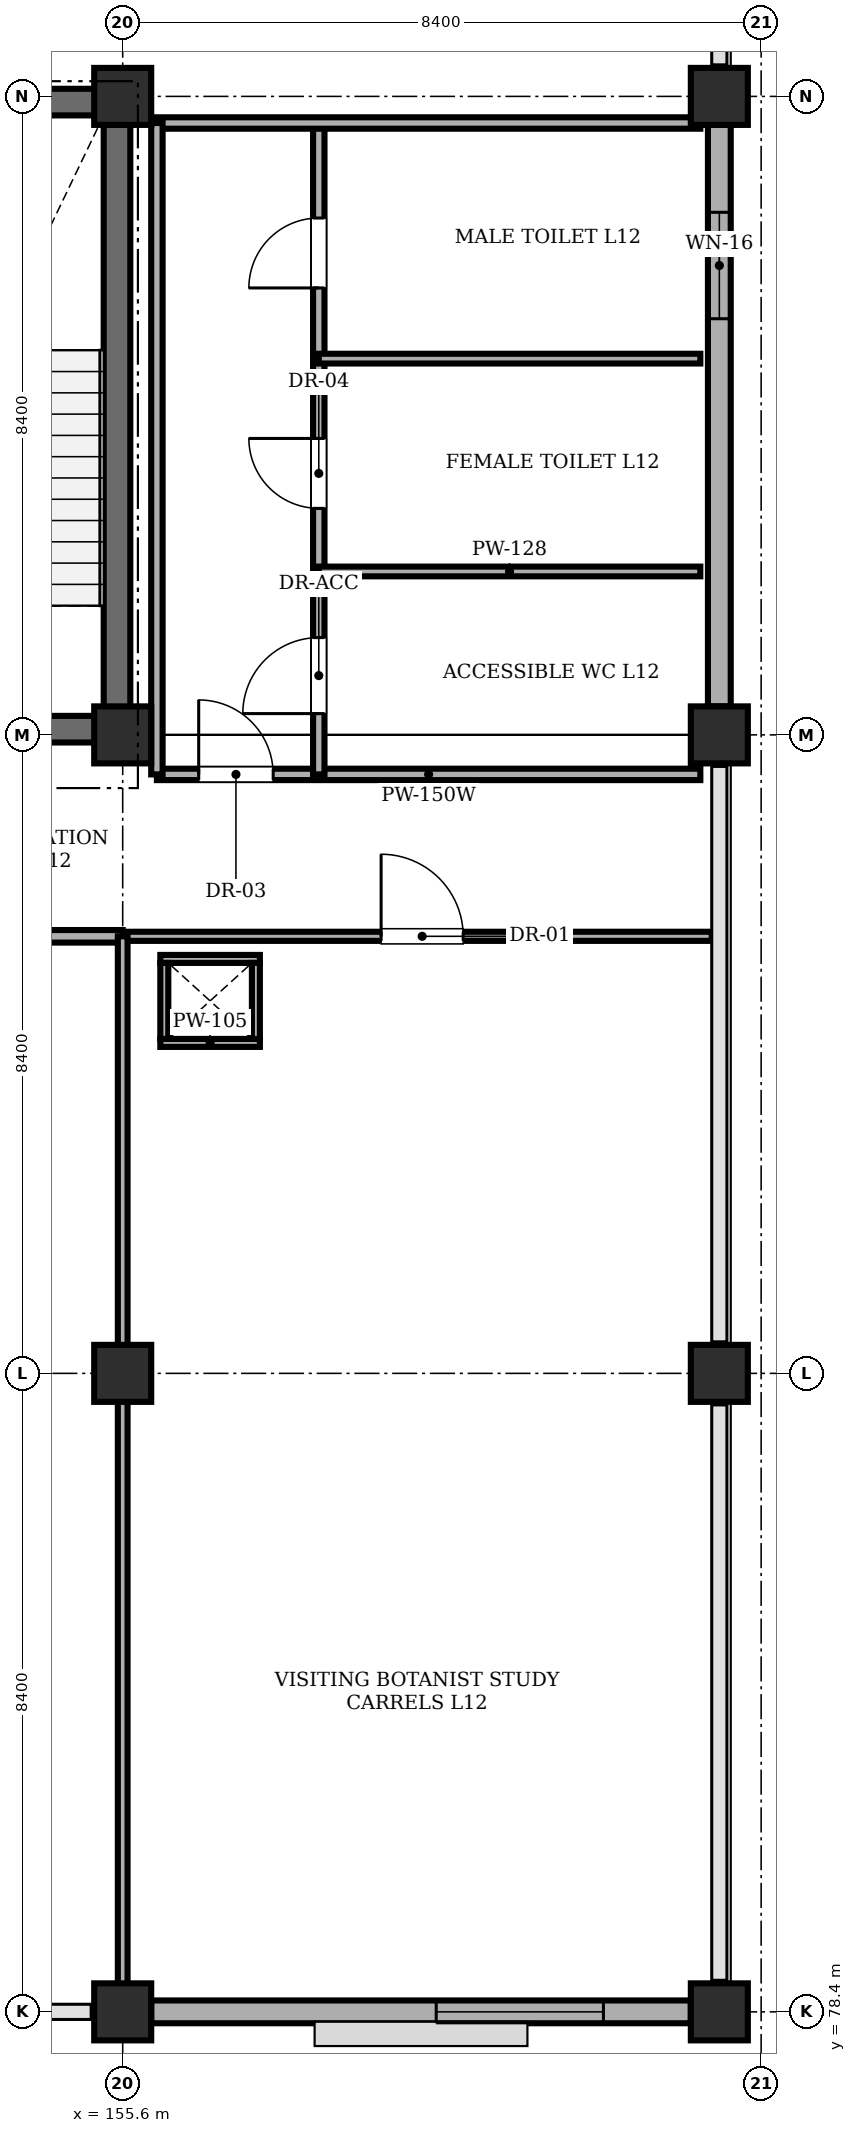
"""IFC4 building model, lengths in metres.
Left out: names, types, materials, properties, quantities, classifications, styles, units other than length and angle.
Written with IfcOpenShell. Run it as: python <this file> out.ifc"""

import sys

from ifc_helpers import new_model, si_unit, direction, frame, frame_2d, origin, origin_2d, place, context, subcontext, project, spatial, rectangle, extrude, element, fill, save


model = new_model("IFC4")
c1 = context("Model", 3, precision=1e-05, world=origin(), true_north=direction((0.0, 1.0)))
c2 = subcontext(c1, "Body", "Model", "MODEL_VIEW")
j1 = project(units=[si_unit("LENGTHUNIT", "METRE"), si_unit("PLANEANGLEUNIT", "RADIAN")], contexts=[c1])
p1 = place(None, origin())
s1 = spatial("IfcSite", under=j1, at=p1, CompositionType="ELEMENT")
p2 = place(p1, origin())
s2 = spatial("IfcBuilding", under=s1, at=p2, CompositionType="ELEMENT")
p3 = place(p2, frame((0.0, 0.0, 48.6)))
s3 = spatial("IfcBuildingStorey", under=s2, at=p3, CompositionType="ELEMENT", Elevation=48.6)
for number, where, z_axis, x_axis in (
    (1, (155.6, 78.4, 0.0), (0.0, 0.0, 1.0), (1.0, 0.0, 0.0)),
    (2, (155.6, 86.8, 0.0), (0.0, 0.0, 1.0), (1.0, 0.0, 0.0)),
    (3, (155.6, 95.2, 0.0), (0.0, 0.0, 1.0), (1.0, 0.0, 0.0)),
    (4, (155.6, 103.6, 0.0), (0.0, 0.0, 1.0), (1.0, 0.0, 0.0)),
    (5, (163.45, 78.4, 0.0), (0.0, 0.0, 1.0), (1.0, 0.0, 0.0)),
    (6, (163.45, 86.8, 0.0), (0.0, 0.0, 1.0), (1.0, 0.0, 0.0)),
    (7, (163.45, 95.2, 0.0), (0.0, 0.0, 1.0), (1.0, 0.0, 0.0)),
    (8, (163.45, 103.6, 0.0), (0.0, 0.0, 1.0), (1.0, 0.0, 0.0)),
):
    element("IfcColumn", number, at=place(p3, frame(where, z_axis=z_axis, x_axis=x_axis)), inside=s3, PredefinedType="COLUMN", context=c2, shape_type="SweptSolid", body=[
        extrude(rectangle(XDim=0.75, YDim=0.75, at=origin_2d()), origin(), (0.0, 0.0, 1.0), 4.03),
    ])
for number, where, z_axis, x_axis in (
    (9, (151.9, 95.275, 0.0), (0.0, 0.0, 1.0), (1.0, 0.0, 0.0)),
    (10, (151.9, 103.525, 0.0), (0.0, 0.0, 1.0), (1.0, 0.0, 0.0)),
):
    element("IfcWall", number, at=place(p3, frame(where, z_axis=z_axis, x_axis=x_axis)), inside=s3, PredefinedType="SHEAR", context=c2, shape_type="SweptSolid", body=[
        extrude(rectangle(XDim=3.8, YDim=0.35, at=frame_2d((1.9, 0.0))), origin(), (0.0, 0.0, 1.0), 4.03),
    ])
p4 = place(p3, frame((155.525, 95.45, 0.0), z_axis=(0.0, 0.0, 1.0), x_axis=(0.0, 1.0, 0.0)))
e11 = element("IfcWall", 11, at=p4, inside=s3, PredefinedType="SHEAR", context=c2, shape_type="SweptSolid", body=[
    extrude(rectangle(XDim=7.9, YDim=0.35, at=frame_2d((3.95, 0.0))), origin(), (0.0, 0.0, 1.0), 4.03),
])
p5 = place(p3, frame((163.075, 78.4, 0.0), z_axis=(0.0, 0.0, 1.0), x_axis=(-1.0, 0.0, 0.0)))
e12 = element("IfcWall", 12, at=p5, inside=s3, PredefinedType="STANDARD", context=c2, shape_type="SweptSolid", body=[
    extrude(rectangle(XDim=7.1, YDim=0.3, at=frame_2d((3.55, 0.0))), origin(), (0.0, 0.0, 1.0), 3.33),
])
p6 = place(p5, frame((1.15, 0.0, 0.95)))
e13 = element("IfcOpeningElement", 13, at=p6, cuts=e12, PredefinedType="OPENING", context=c2, shape_type="SweptSolid", body=[
    extrude(rectangle(XDim=2.2, YDim=2.0, at=frame_2d((1.1, 1.0))), frame((0.0, 0.16, 0.0), z_axis=(0.0, -1.0, 0.0), x_axis=(1.0, 0.0, 0.0)), (0.0, 0.0, 1.0), 0.32),
])
p7 = place(p3, frame((163.45, 103.225, 0.0), z_axis=(0.0, 0.0, 1.0), x_axis=(0.0, -1.0, 0.0)))
e14 = element("IfcWall", 14, at=p7, inside=s3, PredefinedType="STANDARD", context=c2, shape_type="SweptSolid", body=[
    extrude(rectangle(XDim=7.65, YDim=0.3, at=frame_2d((3.825, 0.0))), origin(), (0.0, 0.0, 1.0), 3.33),
])
p8 = place(p7, frame((1.15, 0.0, 1.1)))
e15 = element("IfcOpeningElement", 15, at=p8, cuts=e14, PredefinedType="OPENING", context=c2, shape_type="SweptSolid", body=[
    extrude(rectangle(XDim=1.4, YDim=1.4, at=frame_2d((0.7, 0.7))), frame((0.0, 0.16, 0.0), z_axis=(0.0, -1.0, 0.0), x_axis=(1.0, 0.0, 0.0)), (0.0, 0.0, 1.0), 0.32),
])
p9 = place(p3, frame((156.05, 94.68, 0.0), z_axis=(0.0, 0.0, 1.0), x_axis=(1.0, 0.0, 0.0)))
e16 = element("IfcWall", 16, at=p9, inside=s3, PredefinedType="PARTITIONING", context=c2, shape_type="SweptSolid", body=[
    extrude(rectangle(XDim=7.15, YDim=0.15, at=frame_2d((3.575, 0.0))), origin(), (0.0, 0.0, 1.0), 4.03),
])
p10 = place(p9, frame((0.55, 0.0, 0.0)))
e17 = element("IfcOpeningElement", 17, at=p10, cuts=e16, PredefinedType="OPENING", context=c2, shape_type="SweptSolid", body=[
    extrude(rectangle(XDim=0.98, YDim=2.12, at=frame_2d((0.49, 1.06))), frame((0.0, 0.085, 0.0), z_axis=(0.0, -1.0, 0.0), x_axis=(1.0, 0.0, 0.0)), (0.0, 0.0, 1.0), 0.17),
])
p11 = place(p3, frame((158.18, 94.68, 0.0), z_axis=(0.0, 0.0, 1.0), x_axis=(0.0, 1.0, 0.0)))
e18 = element("IfcWall", 18, at=p11, inside=s3, PredefinedType="PARTITIONING", context=c2, shape_type="SweptSolid", body=[
    extrude(rectangle(XDim=8.57, YDim=0.15, at=frame_2d((4.285, 0.0))), origin(), (0.0, 0.0, 1.0), 4.03),
])
p12 = place(p11, frame((0.8, 0.0, 0.0)))
e19 = element("IfcOpeningElement", 19, at=p12, cuts=e18, PredefinedType="OPENING", context=c2, shape_type="SweptSolid", body=[
    extrude(rectangle(XDim=1.0, YDim=2.12, at=frame_2d((0.5, 1.06))), frame((0.0, 0.085, 0.0), z_axis=(0.0, -1.0, 0.0), x_axis=(1.0, 0.0, 0.0)), (0.0, 0.0, 1.0), 0.17),
])
p13 = place(p11, frame((3.5, 0.0, 0.0)))
e20 = element("IfcOpeningElement", 20, at=p13, cuts=e18, PredefinedType="OPENING", context=c2, shape_type="SweptSolid", body=[
    extrude(rectangle(XDim=0.92, YDim=2.1, at=frame_2d((0.46, 1.05))), frame((0.0, 0.085, 0.0), z_axis=(0.0, -1.0, 0.0), x_axis=(1.0, 0.0, 0.0)), (0.0, 0.0, 1.0), 0.17),
])
p14 = place(p11, frame((6.4, 0.0, 0.0)))
e21 = element("IfcOpeningElement", 21, at=p14, cuts=e18, PredefinedType="OPENING", context=c2, shape_type="SweptSolid", body=[
    extrude(rectangle(XDim=0.92, YDim=2.1, at=frame_2d((0.46, 1.05))), frame((0.0, 0.085, 0.0), z_axis=(0.0, -1.0, 0.0), x_axis=(1.0, 0.0, 0.0)), (0.0, 0.0, 1.0), 0.17),
])
for number, where, z_axis, x_axis in (
    (22, (158.18, 97.35, 0.0), (0.0, 0.0, 1.0), (1.0, 0.0, 0.0)),
    (23, (158.18, 100.15, 0.0), (0.0, 0.0, 1.0), (1.0, 0.0, 0.0)),
):
    element("IfcWall", number, at=place(p3, frame(where, z_axis=z_axis, x_axis=x_axis)), inside=s3, PredefinedType="PARTITIONING", context=c2, shape_type="SweptSolid", body=[
        extrude(rectangle(XDim=5.02, YDim=0.128, at=frame_2d((2.51, 0.0))), origin(), (0.0, 0.0, 1.0), 4.03),
    ])
p15 = place(p3, frame((156.05, 103.25, 0.0), z_axis=(0.0, 0.0, 1.0), x_axis=(1.0, 0.0, 0.0)))
e24 = element("IfcWall", 24, at=p15, inside=s3, PredefinedType="PARTITIONING", context=c2, shape_type="SweptSolid", body=[
    extrude(rectangle(XDim=7.15, YDim=0.15, at=frame_2d((3.575, 0.0))), origin(), (0.0, 0.0, 1.0), 4.03),
])
p16 = place(p3, frame((156.05, 94.68, 0.0), z_axis=(0.0, 0.0, 1.0), x_axis=(0.0, 1.0, 0.0)))
e25 = element("IfcWall", 25, at=p16, inside=s3, PredefinedType="PARTITIONING", context=c2, shape_type="SweptSolid", body=[
    extrude(rectangle(XDim=8.57, YDim=0.15, at=frame_2d((4.285, 0.0))), origin(), (0.0, 0.0, 1.0), 4.03),
])
p17 = place(p3, frame((138.95, 92.55, 0.0), z_axis=(0.0, 0.0, 1.0), x_axis=(1.0, 0.0, 0.0)))
e26 = element("IfcWall", 26, at=p17, inside=s3, PredefinedType="PARTITIONING", context=c2, shape_type="SweptSolid", body=[
    extrude(rectangle(XDim=16.65, YDim=0.165, at=frame_2d((8.325, 0.0))), origin(), (0.0, 0.0, 1.0), 4.03),
])
p18 = place(p17, frame((3.65, 0.0, 0.0)))
e27 = element("IfcOpeningElement", 27, at=p18, cuts=e26, PredefinedType="OPENING", context=c2, shape_type="SweptSolid", body=[
    extrude(rectangle(XDim=1.64, YDim=2.24, at=frame_2d((0.82, 1.12))), frame((0.0, 0.093, 0.0), z_axis=(0.0, -1.0, 0.0), x_axis=(1.0, 0.0, 0.0)), (0.0, 0.0, 1.0), 0.185),
])
p19 = place(p3, frame((155.6, 92.55, 0.0), z_axis=(0.0, 0.0, 1.0), x_axis=(1.0, 0.0, 0.0)))
e28 = element("IfcWall", 28, at=p19, inside=s3, PredefinedType="PARTITIONING", context=c2, shape_type="SweptSolid", body=[
    extrude(rectangle(XDim=7.75, YDim=0.12, at=frame_2d((3.875, 0.0))), origin(), (0.0, 0.0, 1.0), 4.03),
])
p20 = place(p19, frame((3.4, 0.0, 0.0)))
e29 = element("IfcOpeningElement", 29, at=p20, cuts=e28, PredefinedType="OPENING", context=c2, shape_type="SweptSolid", body=[
    extrude(rectangle(XDim=1.08, YDim=2.15, at=frame_2d((0.54, 1.075))), frame((0.0, 0.07, 0.0), z_axis=(0.0, -1.0, 0.0), x_axis=(1.0, 0.0, 0.0)), (0.0, 0.0, 1.0), 0.14),
])
p21 = place(p3, frame((155.6, 78.55, 0.0), z_axis=(0.0, 0.0, 1.0), x_axis=(0.0, 1.0, 0.0)))
e30 = element("IfcWall", 30, at=p21, inside=s3, PredefinedType="PARTITIONING", context=c2, shape_type="SweptSolid", body=[
    extrude(rectangle(XDim=14.0, YDim=0.128, at=frame_2d((7.0, 0.0))), origin(), (0.0, 0.0, 1.0), 3.33),
])
for number, where, z_axis, x_axis in (
    (31, (156.095, 91.147, 0.0), (0.0, 0.0, 1.0), (1.0, 0.0, 0.0)),
    (32, (156.095, 92.252, 0.0), (0.0, 0.0, 1.0), (1.0, 0.0, 0.0)),
):
    element("IfcWall", number, at=place(p3, frame(where, z_axis=z_axis, x_axis=x_axis)), inside=s3, PredefinedType="PARTITIONING", context=c2, shape_type="SweptSolid", body=[
        extrude(rectangle(XDim=1.31, YDim=0.105, at=frame_2d((0.655, 0.0))), origin(), (0.0, 0.0, 1.0), 4.03),
    ])
for number, where, z_axis, x_axis in (
    (33, (156.147, 91.2, 0.0), (0.0, 0.0, 1.0), (0.0, 1.0, 0.0)),
    (34, (157.353, 91.2, 0.0), (0.0, 0.0, 1.0), (0.0, 1.0, 0.0)),
):
    element("IfcWall", number, at=place(p3, frame(where, z_axis=z_axis, x_axis=x_axis)), inside=s3, PredefinedType="PARTITIONING", context=c2, shape_type="SweptSolid", body=[
        extrude(rectangle(XDim=1.0, YDim=0.105, at=frame_2d((0.5, 0.0))), origin(), (0.0, 0.0, 1.0), 4.03),
    ])
p22 = place(p6, origin())
e35 = element("IfcWindow", 35, at=p22, inside=s3, PartitioningType="DOUBLE_PANEL_VERTICAL", PredefinedType="WINDOW", context=c2, shape_type="SweptSolid", body=[
    extrude(rectangle(XDim=2.2, YDim=2.0, at=frame_2d((1.1, 1.0))), frame((0.0, 0.03, 0.0), z_axis=(0.0, -1.0, 0.0), x_axis=(1.0, 0.0, 0.0)), (0.0, 0.0, 1.0), 0.06),
])
fill(e13, e35)
p23 = place(p8, origin())
e36 = element("IfcWindow", 36, at=p23, inside=s3, PartitioningType="SINGLE_PANEL", PredefinedType="WINDOW", context=c2, shape_type="SweptSolid", body=[
    extrude(rectangle(XDim=1.4, YDim=1.4, at=frame_2d((0.7, 0.7))), frame((0.0, 0.03, 0.0), z_axis=(0.0, -1.0, 0.0), x_axis=(1.0, 0.0, 0.0)), (0.0, 0.0, 1.0), 0.06),
])
fill(e15, e36)
p24 = place(p10, origin())
e37 = element("IfcDoor", 37, at=p24, inside=s3, OperationType="SINGLE_SWING_LEFT", PredefinedType="DOOR", context=c2, shape_type="SweptSolid", body=[
    extrude(rectangle(XDim=0.98, YDim=2.12, at=frame_2d((0.49, 1.06))), frame((0.0, 0.025, 0.0), z_axis=(0.0, -1.0, 0.0), x_axis=(1.0, 0.0, 0.0)), (0.0, 0.0, 1.0), 0.05),
])
fill(e17, e37)
p25 = place(p12, origin())
e38 = element("IfcDoor", 38, at=p25, inside=s3, OperationType="SINGLE_SWING_LEFT", PredefinedType="DOOR", context=c2, shape_type="SweptSolid", body=[
    extrude(rectangle(XDim=1.0, YDim=2.12, at=frame_2d((0.5, 1.06))), frame((0.0, 0.025, 0.0), z_axis=(0.0, -1.0, 0.0), x_axis=(1.0, 0.0, 0.0)), (0.0, 0.0, 1.0), 0.05),
])
fill(e19, e38)
p26 = place(p13, origin())
e39 = element("IfcDoor", 39, at=p26, inside=s3, OperationType="SINGLE_SWING_RIGHT", PredefinedType="DOOR", context=c2, shape_type="SweptSolid", body=[
    extrude(rectangle(XDim=0.92, YDim=2.1, at=frame_2d((0.46, 1.05))), frame((0.0, 0.025, 0.0), z_axis=(0.0, -1.0, 0.0), x_axis=(1.0, 0.0, 0.0)), (0.0, 0.0, 1.0), 0.05),
])
fill(e20, e39)
p27 = place(p14, origin())
e40 = element("IfcDoor", 40, at=p27, inside=s3, OperationType="SINGLE_SWING_LEFT", PredefinedType="DOOR", context=c2, shape_type="SweptSolid", body=[
    extrude(rectangle(XDim=0.92, YDim=2.1, at=frame_2d((0.46, 1.05))), frame((0.0, 0.025, 0.0), z_axis=(0.0, -1.0, 0.0), x_axis=(1.0, 0.0, 0.0)), (0.0, 0.0, 1.0), 0.05),
])
fill(e21, e40)
p28 = place(p20, origin())
e41 = element("IfcDoor", 41, at=p28, inside=s3, OperationType="SINGLE_SWING_LEFT", PredefinedType="DOOR", context=c2, shape_type="SweptSolid", body=[
    extrude(rectangle(XDim=1.08, YDim=2.15, at=frame_2d((0.54, 1.075))), frame((0.0, 0.025, 0.0), z_axis=(0.0, -1.0, 0.0), x_axis=(1.0, 0.0, 0.0)), (0.0, 0.0, 1.0), 0.05),
])
fill(e29, e41)
save(model, sys.argv[1])
